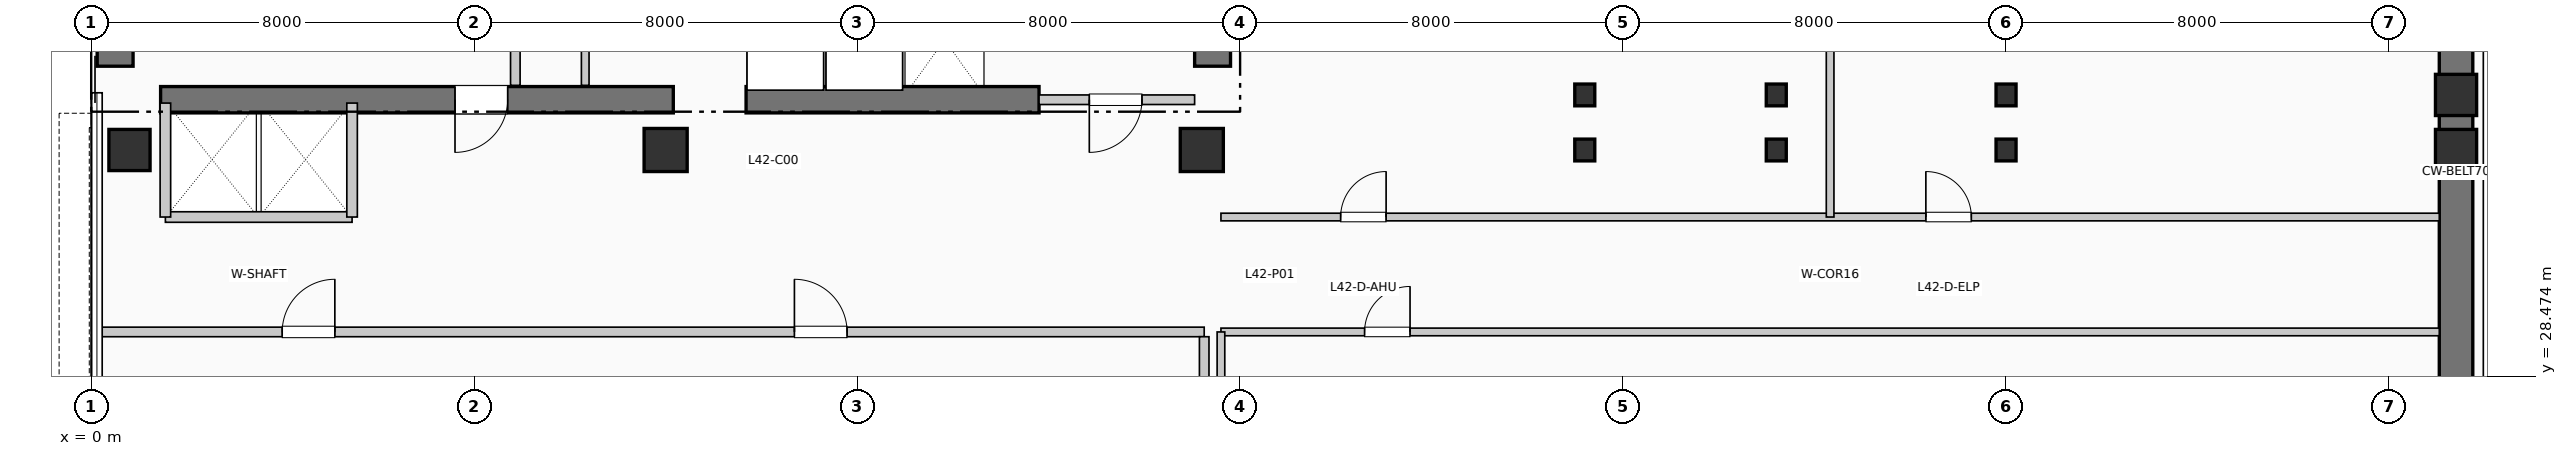
"""IFC4 building model, lengths in metres.
Left out: names, types, materials, properties, quantities, classifications, styles, units other than length and angle.
Written with IfcOpenShell. Run it as: python <this file> out.ifc"""

import sys

from ifc_helpers import new_model, si_unit, direction, frame, frame_2d, origin, origin_2d, place, context, subcontext, project, spatial, rectangle, i_section, extrude, element, fill, save


model = new_model("IFC4")
c1 = context("Model", 3, precision=1e-05, world=origin(), true_north=direction((0.0, 1.0)))
c2 = subcontext(c1, "Body", "Model", "MODEL_VIEW")
j1 = project(units=[si_unit("LENGTHUNIT", "METRE"), si_unit("PLANEANGLEUNIT", "RADIAN")], contexts=[c1])
p1 = place(None, origin())
s1 = spatial("IfcSite", under=j1, at=p1, CompositionType="ELEMENT")
p2 = place(p1, origin())
s2 = spatial("IfcBuilding", under=s1, at=p2, CompositionType="ELEMENT")
p3 = place(p2, frame((0.0, 0.0, 174.57)))
s3 = spatial("IfcBuildingStorey", under=s2, at=p3, CompositionType="ELEMENT", Elevation=174.57)
p4 = place(p3, frame((0.5, 34.95, 0.0), z_axis=(0.0, 0.0, 1.0), x_axis=(0.0, 1.0, 0.0)))
e1 = element("IfcWall", 1, at=p4, inside=s3, PredefinedType="SHEAR", context=c2, shape_type="SweptSolid", body=[
    extrude(rectangle(XDim=7.9, YDim=0.75, at=frame_2d((3.95, 0.0))), origin(), (0.0, 0.0, 1.0), 4.95),
])
p5 = place(p3, frame((23.425, 34.95, 0.0), z_axis=(0.0, 0.0, 1.0), x_axis=(0.0, 1.0, 0.0)))
e2 = element("IfcWall", 2, at=p5, inside=s3, PredefinedType="SHEAR", context=c2, shape_type="SweptSolid", body=[
    extrude(rectangle(XDim=10.64, YDim=0.75, at=frame_2d((5.32, 0.0))), origin(), (0.0, 0.0, 1.0), 4.95),
])
p6 = place(p3, frame((1.45, 34.25, 0.0), z_axis=(0.0, 0.0, 1.0), x_axis=(1.0, 0.0, 0.0)))
e3 = element("IfcWall", 3, at=p6, inside=s3, PredefinedType="SHEAR", context=c2, shape_type="SweptSolid", body=[
    extrude(rectangle(XDim=10.71, YDim=0.55, at=frame_2d((5.355, 0.0))), origin(), (0.0, 0.0, 1.0), 4.95),
])
p7 = place(p6, frame((7.25, 0.0, 0.0), z_axis=(0.0, 0.0, 1.0), x_axis=(-1.0, 0.0, 0.0)))
e4 = element("IfcOpeningElement", 4, at=p7, cuts=e3, PredefinedType="OPENING", context=c2, shape_type="SweptSolid", body=[
    extrude(rectangle(XDim=1.1, YDim=2.15, at=frame_2d((0.55, 1.075))), frame((0.0, 0.285, 0.0), z_axis=(0.0, -1.0, 0.0), x_axis=(1.0, 0.0, 0.0)), (0.0, 0.0, 1.0), 0.57),
])
p8 = place(p3, frame((13.68, 34.25, 0.0), z_axis=(0.0, 0.0, 1.0), x_axis=(1.0, 0.0, 0.0)))
e5 = element("IfcWall", 5, at=p8, inside=s3, PredefinedType="SHEAR", context=c2, shape_type="SweptSolid", body=[
    extrude(rectangle(XDim=6.12, YDim=0.55, at=frame_2d((3.06, 0.0))), origin(), (0.0, 0.0, 1.0), 4.95),
])
p9 = place(p3, frame((49.4, 23.5, 0.0), z_axis=(0.0, 0.0, 1.0), x_axis=(0.0, 1.0, 0.0)))
e6 = element("IfcWall", 6, at=p9, inside=s3, PredefinedType="SHEAR", context=c2, shape_type="SweptSolid", body=[
    extrude(rectangle(XDim=20.9, YDim=0.7, at=frame_2d((10.45, 0.0))), origin(), (0.0, 0.0, 1.0), 4.3),
])
p10 = place(p3, frame((0.8, 33.2, 0.0), z_axis=(0.0, 0.0, 1.0), x_axis=(1.0, 0.0, 0.0)))
e7 = element("IfcColumn", 7, at=p10, inside=s3, PredefinedType="COLUMN", context=c2, shape_type="SweptSolid", body=[
    extrude(rectangle(XDim=0.86, YDim=0.86, at=origin_2d()), origin(), (0.0, 0.0, 1.0), 4.95),
])
for number, where, z_axis, x_axis in (
    (8, (12.0, 33.2, 0.0), (0.0, 0.0, 1.0), (1.0, 0.0, 0.0)),
    (9, (23.2, 33.2, 0.0), (0.0, 0.0, 1.0), (1.0, 0.0, 0.0)),
):
    element("IfcColumn", number, at=place(p3, frame(where, z_axis=z_axis, x_axis=x_axis)), inside=s3, PredefinedType="COLUMN", context=c2, shape_type="SweptSolid", body=[
        extrude(rectangle(XDim=0.9, YDim=0.9, at=origin_2d()), origin(), (0.0, 0.0, 1.0), 4.95),
    ])
for number, where, z_axis, x_axis in (
    (10, (31.2, 33.2, 0.0), (0.0, 0.0, 1.0), (1.0, 0.0, 0.0)),
    (11, (31.2, 34.35, 0.0), (0.0, 0.0, 1.0), (1.0, 0.0, 0.0)),
    (12, (35.2, 33.2, 0.0), (0.0, 0.0, 1.0), (1.0, 0.0, 0.0)),
    (13, (35.2, 34.35, 0.0), (0.0, 0.0, 1.0), (1.0, 0.0, 0.0)),
    (14, (40.0, 33.2, 0.0), (0.0, 0.0, 1.0), (1.0, 0.0, 0.0)),
    (15, (40.0, 34.35, 0.0), (0.0, 0.0, 1.0), (1.0, 0.0, 0.0)),
):
    element("IfcColumn", number, at=place(p3, frame(where, z_axis=z_axis, x_axis=x_axis)), inside=s3, PredefinedType="COLUMN", context=c2, shape_type="SweptSolid", body=[
        extrude(i_section(OverallWidth=0.418, OverallDepth=0.455, WebThickness=0.032, FlangeThickness=0.051, at=origin_2d()), origin(), (0.0, 0.0, 1.0), 4.95),
    ])
for number, where, z_axis, x_axis in (
    (16, (49.4, 33.2, 0.0), (0.0, 0.0, 1.0), (1.0, 0.0, 0.0)),
    (17, (49.4, 34.35, 0.0), (0.0, 0.0, 1.0), (1.0, 0.0, 0.0)),
):
    element("IfcColumn", number, at=place(p3, frame(where, z_axis=z_axis, x_axis=x_axis)), inside=s3, PredefinedType="COLUMN", context=c2, shape_type="SweptSolid", body=[
        extrude(rectangle(XDim=0.86, YDim=0.86, at=origin_2d()), origin(), (0.0, 0.0, 1.0), 4.95),
    ])
p11 = place(p3, frame((8.86, 34.55, 0.0), z_axis=(0.0, 0.0, 1.0), x_axis=(0.0, 1.0, 0.0)))
e18 = element("IfcWall", 18, at=p11, inside=s3, PredefinedType="PARTITIONING", context=c2, shape_type="SweptSolid", body=[
    extrude(rectangle(XDim=2.5, YDim=0.2, at=frame_2d((1.25, 0.0))), origin(), (0.0, 0.0, 1.0), 4.7),
])
p12 = place(p3, frame((19.8, 34.25, 0.0), z_axis=(0.0, 0.0, 1.0), x_axis=(1.0, 0.0, 0.0)))
e19 = element("IfcWall", 19, at=p12, inside=s3, PredefinedType="PARTITIONING", context=c2, shape_type="SweptSolid", body=[
    extrude(rectangle(XDim=3.25, YDim=0.2, at=frame_2d((1.625, 0.0))), origin(), (0.0, 0.0, 1.0), 4.7),
])
p13 = place(p12, frame((2.15, 0.0, 0.0), z_axis=(0.0, 0.0, 1.0), x_axis=(-1.0, 0.0, 0.0)))
e20 = element("IfcOpeningElement", 20, at=p13, cuts=e19, PredefinedType="OPENING", context=c2, shape_type="SweptSolid", body=[
    extrude(rectangle(XDim=1.1, YDim=2.15, at=frame_2d((0.55, 1.075))), frame((0.0, 0.11, 0.0), z_axis=(0.0, -1.0, 0.0), x_axis=(1.0, 0.0, 0.0)), (0.0, 0.0, 1.0), 0.22),
])
p14 = place(p3, frame((1.55, 31.8, 0.0), z_axis=(0.0, 0.0, 1.0), x_axis=(1.0, 0.0, 0.0)))
e21 = element("IfcWall", 21, at=p14, inside=s3, PredefinedType="PARTITIONING", context=c2, shape_type="SweptSolid", body=[
    extrude(rectangle(XDim=3.9, YDim=0.22, at=frame_2d((1.95, 0.0))), origin(), (0.0, 0.0, 1.0), 4.7),
])
for number, where, z_axis, x_axis in (
    (22, (1.55, 31.8, 0.0), (0.0, 0.0, 1.0), (0.0, 1.0, 0.0)),
    (23, (5.45, 31.8, 0.0), (0.0, 0.0, 1.0), (0.0, 1.0, 0.0)),
):
    element("IfcWall", number, at=place(p3, frame(where, z_axis=z_axis, x_axis=x_axis)), inside=s3, PredefinedType="PARTITIONING", context=c2, shape_type="SweptSolid", body=[
        extrude(rectangle(XDim=2.38, YDim=0.22, at=frame_2d((1.19, 0.0))), origin(), (0.0, 0.0, 1.0), 4.7),
    ])
p15 = place(p3, frame((10.32, 34.55, 0.0), z_axis=(0.0, 0.0, 1.0), x_axis=(0.0, 1.0, 0.0)))
e24 = element("IfcWall", 24, at=p15, inside=s3, PredefinedType="PARTITIONING", context=c2, shape_type="SweptSolid", body=[
    extrude(rectangle(XDim=2.15, YDim=0.16, at=frame_2d((1.075, 0.0))), origin(), (0.0, 0.0, 1.0), 4.7),
])
p16 = place(p3, frame((0.19, 29.4, 0.0), z_axis=(0.0, 0.0, 1.0), x_axis=(1.0, 0.0, 0.0)))
e25 = element("IfcWall", 25, at=p16, inside=s3, PredefinedType="PARTITIONING", context=c2, shape_type="SweptSolid", body=[
    extrude(rectangle(XDim=23.06, YDim=0.2, at=frame_2d((11.53, 0.0))), origin(), (0.0, 0.0, 1.0), 4.355),
])
p17 = place(p16, frame((3.8, 0.0, 0.0)))
e26 = element("IfcOpeningElement", 26, at=p17, cuts=e25, PredefinedType="OPENING", context=c2, shape_type="SweptSolid", body=[
    extrude(rectangle(XDim=1.1, YDim=2.15, at=frame_2d((0.55, 1.075))), frame((0.0, 0.11, 0.0), z_axis=(0.0, -1.0, 0.0), x_axis=(1.0, 0.0, 0.0)), (0.0, 0.0, 1.0), 0.22),
])
p18 = place(p16, frame((14.5, 0.0, 0.0)))
e27 = element("IfcOpeningElement", 27, at=p18, cuts=e25, PredefinedType="OPENING", context=c2, shape_type="SweptSolid", body=[
    extrude(rectangle(XDim=1.1, YDim=2.15, at=frame_2d((0.55, 1.075))), frame((0.0, 0.11, 0.0), z_axis=(0.0, -1.0, 0.0), x_axis=(1.0, 0.0, 0.0)), (0.0, 0.0, 1.0), 0.22),
])
p19 = place(p3, frame((23.25, 1.15, 0.0), z_axis=(0.0, 0.0, 1.0), x_axis=(0.0, 1.0, 0.0)))
e28 = element("IfcWall", 28, at=p19, inside=s3, PredefinedType="PARTITIONING", context=c2, shape_type="SweptSolid", body=[
    extrude(rectangle(XDim=28.15, YDim=0.2, at=frame_2d((14.075, 0.0))), origin(), (0.0, 0.0, 1.0), 4.035),
])
p20 = place(p3, frame((23.6, 31.8, 0.0), z_axis=(0.0, 0.0, 1.0), x_axis=(1.0, 0.0, 0.0)))
e29 = element("IfcWall", 29, at=p20, inside=s3, PredefinedType="PARTITIONING", context=c2, shape_type="SweptSolid", body=[
    extrude(rectangle(XDim=25.45, YDim=0.16, at=frame_2d((12.725, 0.0))), origin(), (0.0, 0.0, 1.0), 4.7),
])
p21 = place(p20, frame((2.5, 0.0, 0.0)))
e30 = element("IfcOpeningElement", 30, at=p21, cuts=e29, PredefinedType="OPENING", context=c2, shape_type="SweptSolid", body=[
    extrude(rectangle(XDim=0.95, YDim=2.1, at=frame_2d((0.475, 1.05))), frame((0.0, 0.09, 0.0), z_axis=(0.0, -1.0, 0.0), x_axis=(1.0, 0.0, 0.0)), (0.0, 0.0, 1.0), 0.18),
])
p22 = place(p20, frame((14.725, 0.0, 0.0)))
e31 = element("IfcOpeningElement", 31, at=p22, cuts=e29, PredefinedType="OPENING", context=c2, shape_type="SweptSolid", body=[
    extrude(rectangle(XDim=0.95, YDim=2.1, at=frame_2d((0.475, 1.05))), frame((0.0, 0.09, 0.0), z_axis=(0.0, -1.0, 0.0), x_axis=(1.0, 0.0, 0.0)), (0.0, 0.0, 1.0), 0.18),
])
p23 = place(p3, frame((36.325, 31.8, 0.0), z_axis=(0.0, 0.0, 1.0), x_axis=(0.0, 1.0, 0.0)))
e32 = element("IfcWall", 32, at=p23, inside=s3, PredefinedType="PARTITIONING", context=c2, shape_type="SweptSolid", body=[
    extrude(rectangle(XDim=14.01, YDim=0.16, at=frame_2d((7.005, 0.0))), origin(), (0.0, 0.0, 1.0), 4.7),
])
p24 = place(p3, frame((23.6, 29.4, 0.0), z_axis=(0.0, 0.0, 1.0), x_axis=(1.0, 0.0, 0.0)))
e33 = element("IfcWall", 33, at=p24, inside=s3, PredefinedType="PARTITIONING", context=c2, shape_type="SweptSolid", body=[
    extrude(rectangle(XDim=25.45, YDim=0.16, at=frame_2d((12.725, 0.0))), origin(), (0.0, 0.0, 1.0), 4.355),
])
p25 = place(p24, frame((3.0, 0.0, 0.0)))
e34 = element("IfcOpeningElement", 34, at=p25, cuts=e33, PredefinedType="OPENING", context=c2, shape_type="SweptSolid", body=[
    extrude(rectangle(XDim=0.95, YDim=2.1, at=frame_2d((0.475, 1.05))), frame((0.0, 0.09, 0.0), z_axis=(0.0, -1.0, 0.0), x_axis=(1.0, 0.0, 0.0)), (0.0, 0.0, 1.0), 0.18),
])
p26 = place(p3, frame((23.6, 22.19, 0.0), z_axis=(0.0, 0.0, 1.0), x_axis=(0.0, 1.0, 0.0)))
e35 = element("IfcWall", 35, at=p26, inside=s3, PredefinedType="PARTITIONING", context=c2, shape_type="SweptSolid", body=[
    extrude(rectangle(XDim=7.21, YDim=0.16, at=frame_2d((3.605, 0.0))), origin(), (0.0, 0.0, 1.0), 4.035),
])
p27 = place(p7, origin())
e36 = element("IfcDoor", 36, at=p27, inside=s3, OperationType="SINGLE_SWING_LEFT", PredefinedType="DOOR", context=c2, shape_type="SweptSolid", body=[
    extrude(rectangle(XDim=1.1, YDim=2.15, at=frame_2d((0.55, 1.075))), frame((0.0, 0.025, 0.0), z_axis=(0.0, -1.0, 0.0), x_axis=(1.0, 0.0, 0.0)), (0.0, 0.0, 1.0), 0.05),
])
fill(e4, e36)
p28 = place(p13, origin())
e37 = element("IfcDoor", 37, at=p28, inside=s3, OperationType="SINGLE_SWING_LEFT", PredefinedType="DOOR", context=c2, shape_type="SweptSolid", body=[
    extrude(rectangle(XDim=1.1, YDim=2.15, at=frame_2d((0.55, 1.075))), frame((0.0, 0.025, 0.0), z_axis=(0.0, -1.0, 0.0), x_axis=(1.0, 0.0, 0.0)), (0.0, 0.0, 1.0), 0.05),
])
fill(e20, e37)
p29 = place(p17, origin())
e38 = element("IfcDoor", 38, at=p29, inside=s3, OperationType="SINGLE_SWING_RIGHT", PredefinedType="DOOR", context=c2, shape_type="SweptSolid", body=[
    extrude(rectangle(XDim=1.1, YDim=2.15, at=frame_2d((0.55, 1.075))), frame((0.0, 0.025, 0.0), z_axis=(0.0, -1.0, 0.0), x_axis=(1.0, 0.0, 0.0)), (0.0, 0.0, 1.0), 0.05),
])
fill(e26, e38)
p30 = place(p18, origin())
e39 = element("IfcDoor", 39, at=p30, inside=s3, OperationType="SINGLE_SWING_LEFT", PredefinedType="DOOR", context=c2, shape_type="SweptSolid", body=[
    extrude(rectangle(XDim=1.1, YDim=2.15, at=frame_2d((0.55, 1.075))), frame((0.0, 0.025, 0.0), z_axis=(0.0, -1.0, 0.0), x_axis=(1.0, 0.0, 0.0)), (0.0, 0.0, 1.0), 0.05),
])
fill(e27, e39)
p31 = place(p21, origin())
e40 = element("IfcDoor", 40, at=p31, inside=s3, OperationType="SINGLE_SWING_RIGHT", PredefinedType="DOOR", context=c2, shape_type="SweptSolid", body=[
    extrude(rectangle(XDim=0.95, YDim=2.1, at=frame_2d((0.475, 1.05))), frame((0.0, 0.025, 0.0), z_axis=(0.0, -1.0, 0.0), x_axis=(1.0, 0.0, 0.0)), (0.0, 0.0, 1.0), 0.05),
])
fill(e30, e40)
p32 = place(p22, origin())
e41 = element("IfcDoor", 41, at=p32, inside=s3, OperationType="SINGLE_SWING_LEFT", PredefinedType="DOOR", context=c2, shape_type="SweptSolid", body=[
    extrude(rectangle(XDim=0.95, YDim=2.1, at=frame_2d((0.475, 1.05))), frame((0.0, 0.025, 0.0), z_axis=(0.0, -1.0, 0.0), x_axis=(1.0, 0.0, 0.0)), (0.0, 0.0, 1.0), 0.05),
])
fill(e31, e41)
p33 = place(p25, origin())
e42 = element("IfcDoor", 42, at=p33, inside=s3, OperationType="SINGLE_SWING_RIGHT", PredefinedType="DOOR", context=c2, shape_type="SweptSolid", body=[
    extrude(rectangle(XDim=0.95, YDim=2.1, at=frame_2d((0.475, 1.05))), frame((0.0, 0.025, 0.0), z_axis=(0.0, -1.0, 0.0), x_axis=(1.0, 0.0, 0.0)), (0.0, 0.0, 1.0), 0.05),
])
fill(e34, e42)
save(model, sys.argv[1])
